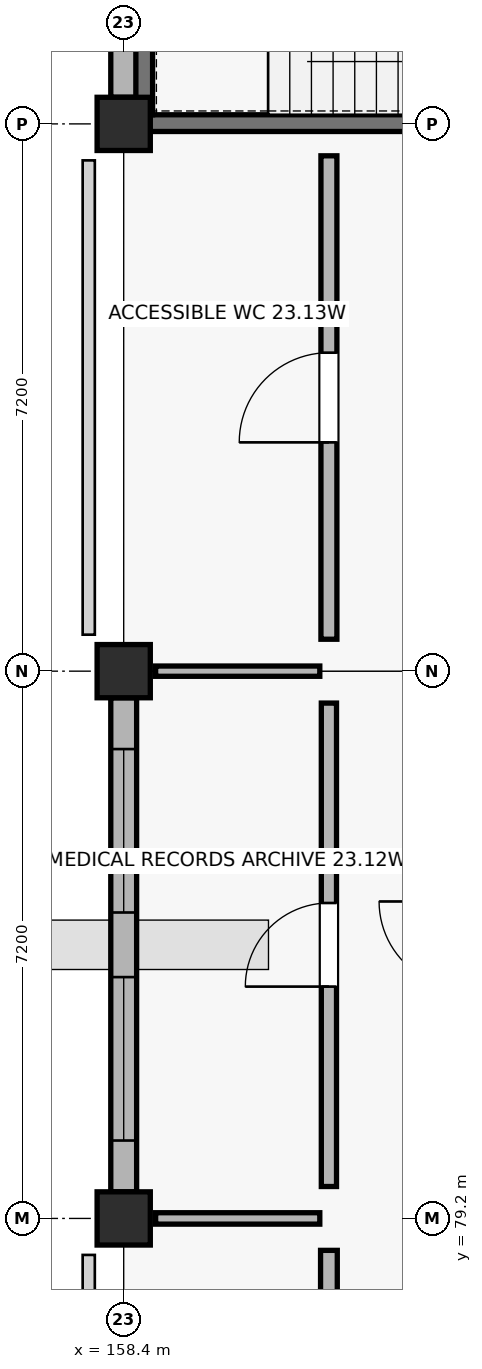
"""IFC4 building model, lengths in metres.
Left out: names, types, materials, properties, quantities, classifications, styles, units other than length and angle.
Written with IfcOpenShell. Run it as: python <this file> out.ifc"""

import sys

from ifc_helpers import new_model, si_unit, direction, frame, frame_2d, origin, origin_2d, place, context, subcontext, project, spatial, rectangle, extrude, element, fill, save


model = new_model("IFC4")
c1 = context("Model", 3, precision=1e-05, world=origin(), true_north=direction((0.0, 1.0)))
c2 = subcontext(c1, "Body", "Model", "MODEL_VIEW")
j1 = project(units=[si_unit("LENGTHUNIT", "METRE"), si_unit("PLANEANGLEUNIT", "RADIAN")], contexts=[c1])
p1 = place(None, origin())
s1 = spatial("IfcSite", under=j1, at=p1, CompositionType="ELEMENT")
p2 = place(p1, origin())
s2 = spatial("IfcBuilding", under=s1, at=p2, CompositionType="ELEMENT")
p3 = place(p2, origin())
s3 = spatial("IfcBuildingStorey", under=s2, at=p3, CompositionType="ELEMENT", Elevation=0.0)
for number, where, z_axis, x_axis in (
    (1, (158.4, 79.2, -0.25), (0.0, 0.0, 1.0), (1.0, 0.0, 0.0)),
    (2, (158.4, 86.4, -0.25), (0.0, 0.0, 1.0), (1.0, 0.0, 0.0)),
    (3, (158.4, 93.6, -0.25), (0.0, 0.0, 1.0), (1.0, 0.0, 0.0)),
):
    element("IfcColumn", number, at=place(p3, frame(where, z_axis=z_axis, x_axis=x_axis)), inside=s3, PredefinedType="COLUMN", context=c2, shape_type="SweptSolid", body=[
        extrude(rectangle(XDim=0.7, YDim=0.7, at=origin_2d()), origin(), (0.0, 0.0, 1.0), 4.75),
    ])
p4 = place(p3, frame((158.4, 86.05, 0.0), z_axis=(0.0, 0.0, 1.0), x_axis=(0.0, -1.0, 0.0)))
e4 = element("IfcWall", 4, at=p4, inside=s3, PredefinedType="SOLIDWALL", context=c2, shape_type="SweptSolid", body=[
    extrude(rectangle(XDim=6.5, YDim=0.34, at=frame_2d((3.25, 0.0))), origin(), (0.0, 0.0, 1.0), 3.52),
])
p5 = place(p4, frame((0.675, 0.0, 0.9)))
e5 = element("IfcOpeningElement", 5, at=p5, cuts=e4, PredefinedType="OPENING", context=c2, shape_type="SweptSolid", body=[
    extrude(rectangle(XDim=2.15, YDim=1.38, at=frame_2d((1.075, 0.69))), frame((0.0, 0.18, 0.0), z_axis=(0.0, -1.0, 0.0), x_axis=(1.0, 0.0, 0.0)), (0.0, 0.0, 1.0), 0.36),
])
p6 = place(p4, frame((3.675, 0.0, 0.9)))
e6 = element("IfcOpeningElement", 6, at=p6, cuts=e4, PredefinedType="OPENING", context=c2, shape_type="SweptSolid", body=[
    extrude(rectangle(XDim=2.15, YDim=1.38, at=frame_2d((1.075, 0.69))), frame((0.0, 0.18, 0.0), z_axis=(0.0, -1.0, 0.0), x_axis=(1.0, 0.0, 0.0)), (0.0, 0.0, 1.0), 0.36),
])
p7 = place(p3, frame((158.4, 100.45, 0.0), z_axis=(0.0, 0.0, 1.0), x_axis=(0.0, -1.0, 0.0)))
e7 = element("IfcWall", 7, at=p7, inside=s3, PredefinedType="SOLIDWALL", context=c2, shape_type="SweptSolid", body=[
    extrude(rectangle(XDim=6.5, YDim=0.34, at=frame_2d((3.25, 0.0))), origin(), (0.0, 0.0, 1.0), 3.52),
])
p8 = place(p3, frame((158.56, 93.61, -0.25), z_axis=(0.0, 0.0, 1.0), x_axis=(1.0, 0.0, 0.0)))
e8 = element("IfcWall", 8, at=p8, inside=s3, PredefinedType="SHEAR", context=c2, shape_type="SweptSolid", body=[
    extrude(rectangle(XDim=6.88, YDim=0.22, at=frame_2d((3.44, 0.0))), origin(), (0.0, 0.0, 1.0), 4.47),
])
p9 = place(p8, frame((5.3, 0.0, 0.25)))
e9 = element("IfcOpeningElement", 9, at=p9, cuts=e8, PredefinedType="OPENING", context=c2, shape_type="SweptSolid", body=[
    extrude(rectangle(XDim=1.15, YDim=2.15, at=frame_2d((0.575, 1.075))), frame((0.0, 0.12, 0.0), z_axis=(0.0, -1.0, 0.0), x_axis=(1.0, 0.0, 0.0)), (0.0, 0.0, 1.0), 0.24),
])
p10 = place(p3, frame((158.67, 93.72, -0.25), z_axis=(0.0, 0.0, 1.0), x_axis=(0.0, 1.0, 0.0)))
e10 = element("IfcWall", 10, at=p10, inside=s3, PredefinedType="SHEAR", context=c2, shape_type="SweptSolid", body=[
    extrude(rectangle(XDim=3.0, YDim=0.22, at=frame_2d((1.5, 0.0))), origin(), (0.0, 0.0, 1.0), 4.47),
])
p11 = place(p3, frame((161.1, 72.42, 0.0), z_axis=(0.0, 0.0, 1.0), x_axis=(0.0, 1.0, 0.0)))
e11 = element("IfcWall", 11, at=p11, inside=s3, PredefinedType="SOLIDWALL", context=c2, shape_type="SweptSolid", body=[
    extrude(rectangle(XDim=6.36, YDim=0.22, at=frame_2d((3.18, 0.0))), origin(), (0.0, 0.0, 1.0), 3.36),
])
p12 = place(p11, frame((2.67, 0.0, 0.0)))
e12 = element("IfcOpeningElement", 12, at=p12, cuts=e11, PredefinedType="OPENING", context=c2, shape_type="SweptSolid", body=[
    extrude(rectangle(XDim=1.02, YDim=2.04, at=frame_2d((0.51, 1.02))), frame((0.0, 0.12, 0.0), z_axis=(0.0, -1.0, 0.0), x_axis=(1.0, 0.0, 0.0)), (0.0, 0.0, 1.0), 0.24),
])
p13 = place(p3, frame((158.82, 79.2, 0.0), z_axis=(0.0, 0.0, 1.0), x_axis=(1.0, 0.0, 0.0)))
e13 = element("IfcWall", 13, at=p13, inside=s3, PredefinedType="PARTITIONING", context=c2, shape_type="SweptSolid", body=[
    extrude(rectangle(XDim=2.16, YDim=0.15, at=frame_2d((1.08, 0.0))), origin(), (0.0, 0.0, 1.0), 3.36),
])
p14 = place(p3, frame((161.1, 79.62, 0.0), z_axis=(0.0, 0.0, 1.0), x_axis=(0.0, 1.0, 0.0)))
e14 = element("IfcWall", 14, at=p14, inside=s3, PredefinedType="SOLIDWALL", context=c2, shape_type="SweptSolid", body=[
    extrude(rectangle(XDim=6.36, YDim=0.2, at=frame_2d((3.18, 0.0))), origin(), (0.0, 0.0, 1.0), 3.36),
])
p15 = place(p14, frame((2.63, 0.0, 0.0)))
e15 = element("IfcOpeningElement", 15, at=p15, cuts=e14, PredefinedType="OPENING", context=c2, shape_type="SweptSolid", body=[
    extrude(rectangle(XDim=1.1, YDim=2.04, at=frame_2d((0.55, 1.02))), frame((0.0, 0.11, 0.0), z_axis=(0.0, -1.0, 0.0), x_axis=(1.0, 0.0, 0.0)), (0.0, 0.0, 1.0), 0.22),
])
p16 = place(p3, frame((158.82, 86.4, 0.0), z_axis=(0.0, 0.0, 1.0), x_axis=(1.0, 0.0, 0.0)))
e16 = element("IfcWall", 16, at=p16, inside=s3, PredefinedType="PARTITIONING", context=c2, shape_type="SweptSolid", body=[
    extrude(rectangle(XDim=2.16, YDim=0.135, at=frame_2d((1.08, 0.0))), origin(), (0.0, 0.0, 1.0), 3.36),
])
p17 = place(p3, frame((161.1, 86.82, 0.0), z_axis=(0.0, 0.0, 1.0), x_axis=(0.0, 1.0, 0.0)))
e17 = element("IfcWall", 17, at=p17, inside=s3, PredefinedType="PLUMBINGWALL", context=c2, shape_type="SweptSolid", body=[
    extrude(rectangle(XDim=6.36, YDim=0.21, at=frame_2d((3.18, 0.0))), origin(), (0.0, 0.0, 1.0), 3.36),
])
p18 = place(p17, frame((2.59, 0.0, 0.0)))
e18 = element("IfcOpeningElement", 18, at=p18, cuts=e17, PredefinedType="OPENING", context=c2, shape_type="SweptSolid", body=[
    extrude(rectangle(XDim=1.18, YDim=2.04, at=frame_2d((0.59, 1.02))), frame((0.0, 0.115, 0.0), z_axis=(0.0, -1.0, 0.0), x_axis=(1.0, 0.0, 0.0)), (0.0, 0.0, 1.0), 0.23),
])
p19 = place(p5, origin())
e19 = element("IfcWindow", 19, at=p19, inside=s3, PartitioningType="SINGLE_PANEL", PredefinedType="WINDOW", context=c2, shape_type="SweptSolid", body=[
    extrude(rectangle(XDim=2.15, YDim=1.38, at=frame_2d((1.075, 0.69))), frame((0.0, 0.03, 0.0), z_axis=(0.0, -1.0, 0.0), x_axis=(1.0, 0.0, 0.0)), (0.0, 0.0, 1.0), 0.06),
])
fill(e5, e19)
p20 = place(p6, origin())
e20 = element("IfcWindow", 20, at=p20, inside=s3, PartitioningType="SINGLE_PANEL", PredefinedType="WINDOW", context=c2, shape_type="SweptSolid", body=[
    extrude(rectangle(XDim=2.15, YDim=1.38, at=frame_2d((1.075, 0.69))), frame((0.0, 0.03, 0.0), z_axis=(0.0, -1.0, 0.0), x_axis=(1.0, 0.0, 0.0)), (0.0, 0.0, 1.0), 0.06),
])
fill(e6, e20)
p21 = place(p15, origin())
e21 = element("IfcDoor", 21, at=p21, inside=s3, OperationType="SINGLE_SWING_LEFT", PredefinedType="DOOR", context=c2, shape_type="SweptSolid", body=[
    extrude(rectangle(XDim=1.1, YDim=2.04, at=frame_2d((0.55, 1.02))), frame((0.0, 0.025, 0.0), z_axis=(0.0, -1.0, 0.0), x_axis=(1.0, 0.0, 0.0)), (0.0, 0.0, 1.0), 0.05),
])
fill(e15, e21)
p22 = place(p18, origin())
e22 = element("IfcDoor", 22, at=p22, inside=s3, OperationType="SINGLE_SWING_LEFT", PredefinedType="DOOR", context=c2, shape_type="SweptSolid", body=[
    extrude(rectangle(XDim=1.18, YDim=2.04, at=frame_2d((0.59, 1.02))), frame((0.0, 0.025, 0.0), z_axis=(0.0, -1.0, 0.0), x_axis=(1.0, 0.0, 0.0)), (0.0, 0.0, 1.0), 0.05),
])
fill(e18, e22)
save(model, sys.argv[1])
